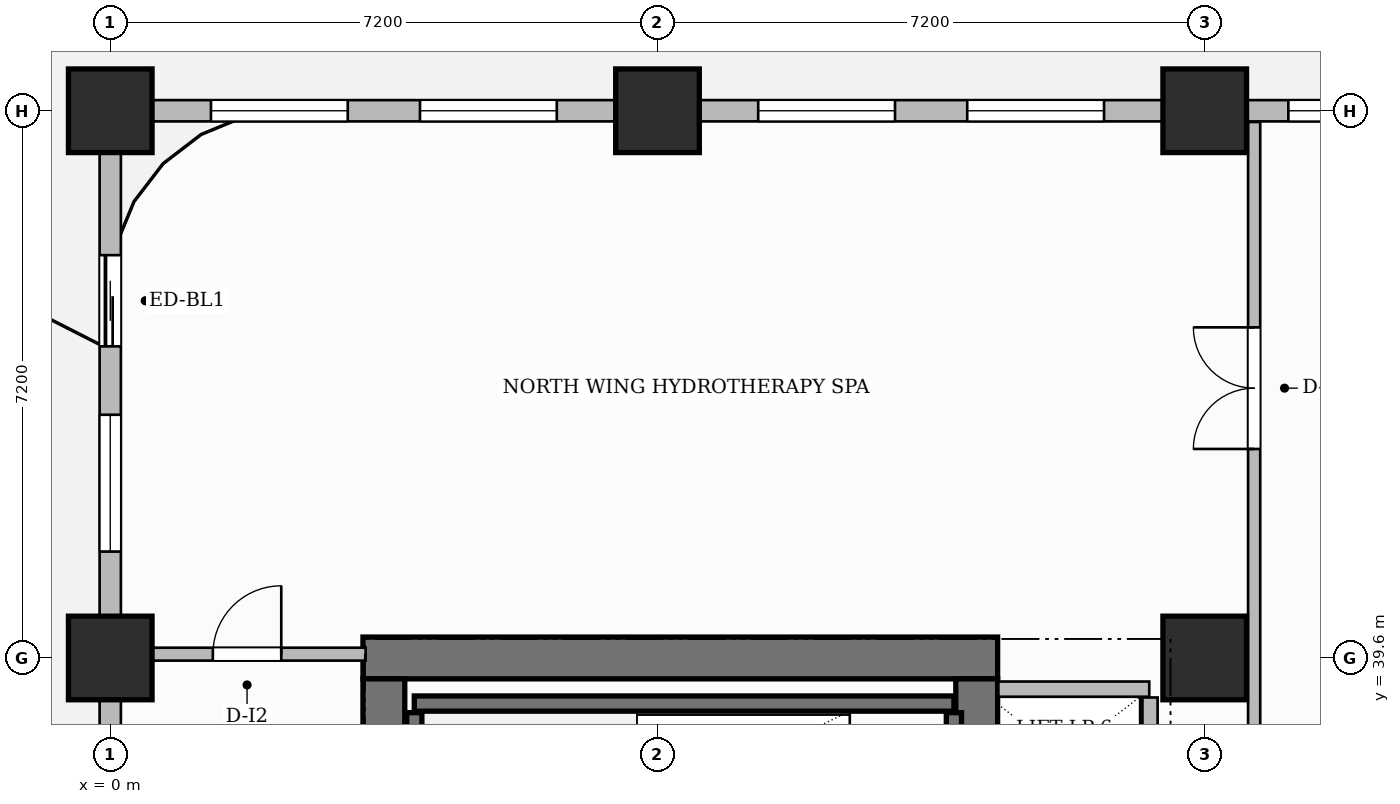
"""IFC4 building model, lengths in metres.
Left out: names, types, materials, properties, quantities, classifications, styles, units other than length and angle.
Written with IfcOpenShell. Run it as: python <this file> out.ifc"""

import sys

from ifc_helpers import new_model, si_unit, direction, frame, frame_2d, origin, origin_2d, place, context, subcontext, project, spatial, rectangle, extrude, source, transform, mapped, element, fill, save


model = new_model("IFC4")
c1 = context("Model", 3, precision=1e-05, world=origin(), true_north=direction((0.0, 1.0)))
c2 = subcontext(c1, "Body", "Model", "MODEL_VIEW")
j1 = project(units=[si_unit("LENGTHUNIT", "METRE"), si_unit("PLANEANGLEUNIT", "RADIAN")], contexts=[c1])
p1 = place(None, origin())
s1 = spatial("IfcSite", under=j1, at=p1, CompositionType="ELEMENT")
p2 = place(p1, origin())
s2 = spatial("IfcBuilding", under=s1, at=p2, CompositionType="ELEMENT")
p3 = place(p2, frame((0.0, 0.0, 65.7)))
s3 = spatial("IfcBuildingStorey", under=s2, at=p3, CompositionType="ELEMENT", Elevation=65.7)
p4 = place(p3, frame((3.325, 39.6, 0.0), z_axis=(0.0, 0.0, 1.0), x_axis=(1.0, 0.0, 0.0)))
e1 = element("IfcWall", 1, at=p4, inside=s3, PredefinedType="SHEAR", context=c2, shape_type="SweptSolid", body=[
    extrude(rectangle(XDim=8.35, YDim=0.55, at=frame_2d((4.175, 0.0))), origin(), (0.0, 0.0, 1.0), 3.7),
])
p5 = place(p3, frame((3.6, 25.475, 0.0), z_axis=(0.0, 0.0, 1.0), x_axis=(0.0, 1.0, 0.0)))
e2 = element("IfcWall", 2, at=p5, inside=s3, PredefinedType="SHEAR", context=c2, shape_type="SweptSolid", body=[
    extrude(rectangle(XDim=13.85, YDim=0.55, at=frame_2d((6.925, 0.0))), origin(), (0.0, 0.0, 1.0), 3.7),
])
p6 = place(p3, frame((11.4, 25.475, 0.0), z_axis=(0.0, 0.0, 1.0), x_axis=(0.0, 1.0, 0.0)))
e3 = element("IfcWall", 3, at=p6, inside=s3, PredefinedType="SHEAR", context=c2, shape_type="SweptSolid", body=[
    extrude(rectangle(XDim=13.85, YDim=0.55, at=frame_2d((6.925, 0.0))), origin(), (0.0, 0.0, 1.0), 3.7),
])
p7 = place(p6, frame((6.495, 0.0, 0.0)))
e4 = element("IfcOpeningElement", 4, at=p7, cuts=e3, PredefinedType="OPENING", context=c2, shape_type="SweptSolid", body=[
    extrude(rectangle(XDim=1.5, YDim=2.2, at=frame_2d((0.75, 1.1))), frame((0.0, 0.285, 0.0), z_axis=(0.0, -1.0, 0.0), x_axis=(1.0, 0.0, 0.0)), (0.0, 0.0, 1.0), 0.57),
])
m1 = source(origin(), c2, "Body", "SweptSolid", [
    extrude(rectangle(XDim=1.1, YDim=1.1, at=origin_2d()), origin(), (0.0, 0.0, 1.0), 3.7),
])
for number, where, z_axis, x_axis in (
    (5, (0.0, 39.6, 0.0), (0.0, 0.0, 1.0), (1.0, 0.0, 0.0)),
    (6, (0.0, 46.8, 0.0), (0.0, 0.0, 1.0), (1.0, 0.0, 0.0)),
    (7, (7.2, 46.8, 0.0), (0.0, 0.0, 1.0), (1.0, 0.0, 0.0)),
    (8, (14.4, 39.6, 0.0), (0.0, 0.0, 1.0), (1.0, 0.0, 0.0)),
    (9, (14.4, 46.8, 0.0), (0.0, 0.0, 1.0), (1.0, 0.0, 0.0)),
):
    element("IfcColumn", number, at=place(p3, frame(where, z_axis=z_axis, x_axis=x_axis)), inside=s3, PredefinedType="COLUMN", context=c2, shape_type="MappedRepresentation", body=[
        mapped(m1, transform((0.0, 0.0, 0.0), scale=1.0)),
    ])
p8 = place(p3, frame((4.0, 39.0, 0.0), z_axis=(0.0, 0.0, 1.0), x_axis=(1.0, 0.0, 0.0)))
e10 = element("IfcWall", 10, at=p8, inside=s3, PredefinedType="SHEAR", context=c2, shape_type="SweptSolid", body=[
    extrude(rectangle(XDim=7.1, YDim=0.2, at=frame_2d((3.55, 0.0))), origin(), (0.0, 0.0, 1.0), 3.7),
])
for number, where, z_axis, x_axis in (
    (11, (4.0, 36.18, 0.0), (0.0, 0.0, 1.0), (0.0, 1.0, 0.0)),
    (12, (11.1, 36.18, 0.0), (0.0, 0.0, 1.0), (0.0, 1.0, 0.0)),
):
    element("IfcWall", number, at=place(p3, frame(where, z_axis=z_axis, x_axis=x_axis)), inside=s3, PredefinedType="SHEAR", context=c2, shape_type="SweptSolid", body=[
        extrude(rectangle(XDim=2.7, YDim=0.2, at=frame_2d((1.35, 0.0))), origin(), (0.0, 0.0, 1.0), 3.7),
    ])
p9 = place(p3, frame((11.685, 39.19, 0.0), z_axis=(0.0, 0.0, 1.0), x_axis=(1.0, 0.0, 0.0)))
e13 = element("IfcWall", 13, at=p9, inside=s3, PredefinedType="PARTITIONING", context=c2, shape_type="SweptSolid", body=[
    extrude(rectangle(XDim=1.985, YDim=0.2, at=frame_2d((0.992, 0.0))), origin(), (0.0, 0.0, 1.0), 3.45),
])
p10 = place(p3, frame((13.68, 34.36, 0.0), z_axis=(0.0, 0.0, 1.0), x_axis=(0.0, 1.0, 0.0)))
e14 = element("IfcWall", 14, at=p10, inside=s3, PredefinedType="PARTITIONING", context=c2, shape_type="SweptSolid", body=[
    extrude(rectangle(XDim=4.72, YDim=0.2, at=frame_2d((2.36, 0.0))), origin(), (0.0, 0.0, 1.0), 3.45),
])
p11 = place(p3, frame((0.24, 39.65, 0.0), z_axis=(0.0, 0.0, 1.0), x_axis=(1.0, 0.0, 0.0)))
e15 = element("IfcWall", 15, at=p11, inside=s3, PredefinedType="PARTITIONING", context=c2, shape_type="SweptSolid", body=[
    extrude(rectangle(XDim=3.12, YDim=0.17, at=frame_2d((1.56, 0.0))), origin(), (0.0, 0.0, 1.0), 3.45),
])
p12 = place(p11, frame((1.11, 0.0, 0.0)))
e16 = element("IfcOpeningElement", 16, at=p12, cuts=e15, PredefinedType="OPENING", context=c2, shape_type="SweptSolid", body=[
    extrude(rectangle(XDim=0.9, YDim=2.15, at=frame_2d((0.45, 1.075))), frame((0.0, 0.095, 0.0), z_axis=(0.0, -1.0, 0.0), x_axis=(1.0, 0.0, 0.0)), (0.0, 0.0, 1.0), 0.19),
])
p13 = place(p3, frame((15.05, 34.34, 0.0), z_axis=(0.0, 0.0, 1.0), x_axis=(0.0, 1.0, 0.0)))
e17 = element("IfcWall", 17, at=p13, inside=s3, PredefinedType="PARTITIONING", context=c2, shape_type="SweptSolid", body=[
    extrude(rectangle(XDim=12.312, YDim=0.16, at=frame_2d((6.156, 0.0))), origin(), (0.0, 0.0, 1.0), 3.45),
])
p14 = place(p13, frame((8.01, 0.0, 0.0)))
e18 = element("IfcOpeningElement", 18, at=p14, cuts=e17, PredefinedType="OPENING", context=c2, shape_type="SweptSolid", body=[
    extrude(rectangle(XDim=1.6, YDim=2.4, at=frame_2d((0.8, 1.2))), frame((0.0, 0.09, 0.0), z_axis=(0.0, -1.0, 0.0), x_axis=(1.0, 0.0, 0.0)), (0.0, 0.0, 1.0), 0.18),
])
p15 = place(p3, frame((0.0, 25.25, 0.0), z_axis=(0.0, 0.0, 1.0), x_axis=(0.0, 1.0, 0.0)))
e19 = element("IfcWall", 19, at=p15, inside=s3, PredefinedType="SOLIDWALL", context=c2, shape_type="SweptSolid", body=[
    extrude(rectangle(XDim=21.5, YDim=0.28, at=frame_2d((10.75, 0.0))), origin(), (0.0, 0.0, 1.0), 2.885),
])
p16 = place(p15, frame((18.45, 0.0, 0.0)))
e20 = element("IfcOpeningElement", 20, at=p16, cuts=e19, PredefinedType="OPENING", context=c2, shape_type="SweptSolid", body=[
    extrude(rectangle(XDim=1.2, YDim=2.2, at=frame_2d((0.6, 1.1))), frame((0.0, 0.15, 0.0), z_axis=(0.0, -1.0, 0.0), x_axis=(1.0, 0.0, 0.0)), (0.0, 0.0, 1.0), 0.3),
])
p17 = place(p15, frame((0.8, 0.0, 0.0)))
e21 = element("IfcOpeningElement", 21, at=p17, cuts=e19, PredefinedType="OPENING", context=c2, shape_type="SweptSolid", body=[
    extrude(rectangle(XDim=1.2, YDim=2.2, at=frame_2d((0.6, 1.1))), frame((0.0, 0.15, 0.0), z_axis=(0.0, -1.0, 0.0), x_axis=(1.0, 0.0, 0.0)), (0.0, 0.0, 1.0), 0.3),
])
p18 = place(p15, frame((3.425, 0.0, 0.8)))
e22 = element("IfcOpeningElement", 22, at=p18, cuts=e19, PredefinedType="OPENING", context=c2, shape_type="SweptSolid", body=[
    extrude(rectangle(XDim=1.8, YDim=1.85, at=frame_2d((0.9, 0.925))), frame((0.0, 0.15, 0.0), z_axis=(0.0, -1.0, 0.0), x_axis=(1.0, 0.0, 0.0)), (0.0, 0.0, 1.0), 0.3),
])
p19 = place(p15, frame((8.475, 0.0, 0.8)))
e23 = element("IfcOpeningElement", 23, at=p19, cuts=e19, PredefinedType="OPENING", context=c2, shape_type="SweptSolid", body=[
    extrude(rectangle(XDim=1.8, YDim=1.85, at=frame_2d((0.9, 0.925))), frame((0.0, 0.15, 0.0), z_axis=(0.0, -1.0, 0.0), x_axis=(1.0, 0.0, 0.0)), (0.0, 0.0, 1.0), 0.3),
])
p20 = place(p15, frame((11.225, 0.0, 0.8)))
e24 = element("IfcOpeningElement", 24, at=p20, cuts=e19, PredefinedType="OPENING", context=c2, shape_type="SweptSolid", body=[
    extrude(rectangle(XDim=1.8, YDim=1.85, at=frame_2d((0.9, 0.925))), frame((0.0, 0.15, 0.0), z_axis=(0.0, -1.0, 0.0), x_axis=(1.0, 0.0, 0.0)), (0.0, 0.0, 1.0), 0.3),
])
p21 = place(p15, frame((15.75, 0.0, 0.8)))
e25 = element("IfcOpeningElement", 25, at=p21, cuts=e19, PredefinedType="OPENING", context=c2, shape_type="SweptSolid", body=[
    extrude(rectangle(XDim=1.8, YDim=1.85, at=frame_2d((0.9, 0.925))), frame((0.0, 0.15, 0.0), z_axis=(0.0, -1.0, 0.0), x_axis=(1.0, 0.0, 0.0)), (0.0, 0.0, 1.0), 0.3),
])
p22 = place(p3, frame((0.0, 46.8, 0.0), z_axis=(0.0, 0.0, 1.0), x_axis=(1.0, 0.0, 0.0)))
e26 = element("IfcWall", 26, at=p22, inside=s3, PredefinedType="SOLIDWALL", context=c2, shape_type="SweptSolid", body=[
    extrude(rectangle(XDim=18.0, YDim=0.28, at=frame_2d((9.0, 0.0))), origin(), (0.0, 0.0, 1.0), 2.885),
])
p23 = place(p22, frame((1.325, 0.0, 0.8)))
e27 = element("IfcOpeningElement", 27, at=p23, cuts=e26, PredefinedType="OPENING", context=c2, shape_type="SweptSolid", body=[
    extrude(rectangle(XDim=1.8, YDim=1.85, at=frame_2d((0.9, 0.925))), frame((0.0, 0.15, 0.0), z_axis=(0.0, -1.0, 0.0), x_axis=(1.0, 0.0, 0.0)), (0.0, 0.0, 1.0), 0.3),
])
p24 = place(p22, frame((4.075, 0.0, 0.8)))
e28 = element("IfcOpeningElement", 28, at=p24, cuts=e26, PredefinedType="OPENING", context=c2, shape_type="SweptSolid", body=[
    extrude(rectangle(XDim=1.8, YDim=1.85, at=frame_2d((0.9, 0.925))), frame((0.0, 0.15, 0.0), z_axis=(0.0, -1.0, 0.0), x_axis=(1.0, 0.0, 0.0)), (0.0, 0.0, 1.0), 0.3),
])
p25 = place(p22, frame((8.525, 0.0, 0.8)))
e29 = element("IfcOpeningElement", 29, at=p25, cuts=e26, PredefinedType="OPENING", context=c2, shape_type="SweptSolid", body=[
    extrude(rectangle(XDim=1.8, YDim=1.85, at=frame_2d((0.9, 0.925))), frame((0.0, 0.15, 0.0), z_axis=(0.0, -1.0, 0.0), x_axis=(1.0, 0.0, 0.0)), (0.0, 0.0, 1.0), 0.3),
])
p26 = place(p22, frame((11.275, 0.0, 0.8)))
e30 = element("IfcOpeningElement", 30, at=p26, cuts=e26, PredefinedType="OPENING", context=c2, shape_type="SweptSolid", body=[
    extrude(rectangle(XDim=1.8, YDim=1.85, at=frame_2d((0.9, 0.925))), frame((0.0, 0.15, 0.0), z_axis=(0.0, -1.0, 0.0), x_axis=(1.0, 0.0, 0.0)), (0.0, 0.0, 1.0), 0.3),
])
p27 = place(p22, frame((15.5, 0.0, 0.8)))
e31 = element("IfcOpeningElement", 31, at=p27, cuts=e26, PredefinedType="OPENING", context=c2, shape_type="SweptSolid", body=[
    extrude(rectangle(XDim=1.4, YDim=1.85, at=frame_2d((0.7, 0.925))), frame((0.0, 0.15, 0.0), z_axis=(0.0, -1.0, 0.0), x_axis=(1.0, 0.0, 0.0)), (0.0, 0.0, 1.0), 0.3),
])
m2 = source(origin(), c2, "Body", "SweptSolid", [
    extrude(rectangle(XDim=0.9, YDim=2.15, at=frame_2d((0.45, 1.075))), frame((0.0, 0.025, 0.0), z_axis=(0.0, -1.0, 0.0), x_axis=(1.0, 0.0, 0.0)), (0.0, 0.0, 1.0), 0.05),
])
p28 = place(p12, origin())
e32 = element("IfcDoor", 32, at=p28, inside=s3, OperationType="SINGLE_SWING_RIGHT", PredefinedType="DOOR", context=c2, shape_type="MappedRepresentation", body=[
    mapped(m2, transform((0.0, 0.0, 0.0), scale=1.0)),
])
fill(e16, e32)
m3 = source(origin(), c2, "Body", "SweptSolid", [
    extrude(rectangle(XDim=1.6, YDim=2.4, at=frame_2d((0.8, 1.2))), frame((0.0, 0.025, 0.0), z_axis=(0.0, -1.0, 0.0), x_axis=(1.0, 0.0, 0.0)), (0.0, 0.0, 1.0), 0.05),
])
p29 = place(p14, origin())
e33 = element("IfcDoor", 33, at=p29, inside=s3, OperationType="DOUBLE_DOOR_SINGLE_SWING", PredefinedType="DOOR", context=c2, shape_type="MappedRepresentation", body=[
    mapped(m3, transform((0.0, 0.0, 0.0), scale=1.0)),
])
fill(e18, e33)
m4 = source(origin(), c2, "Body", "SweptSolid", [
    extrude(rectangle(XDim=1.2, YDim=2.2, at=frame_2d((0.6, 1.1))), frame((0.0, 0.025, 0.0), z_axis=(0.0, -1.0, 0.0), x_axis=(1.0, 0.0, 0.0)), (0.0, 0.0, 1.0), 0.05),
])
p30 = place(p16, origin())
e34 = element("IfcDoor", 34, at=p30, inside=s3, OperationType="SLIDING_TO_LEFT", PredefinedType="DOOR", context=c2, shape_type="MappedRepresentation", body=[
    mapped(m4, transform((0.0, 0.0, 0.0), scale=1.0)),
])
fill(e20, e34)
m5 = source(origin(), c2, "Body", "SweptSolid", [
    extrude(rectangle(XDim=1.8, YDim=1.85, at=frame_2d((0.9, 0.925))), frame((0.0, 0.03, 0.0), z_axis=(0.0, -1.0, 0.0), x_axis=(1.0, 0.0, 0.0)), (0.0, 0.0, 1.0), 0.06),
])
p31 = place(p21, origin())
e35 = element("IfcWindow", 35, at=p31, inside=s3, PartitioningType="DOUBLE_PANEL_VERTICAL", PredefinedType="WINDOW", context=c2, shape_type="MappedRepresentation", body=[
    mapped(m5, transform((0.0, 0.0, 0.0), scale=1.0)),
])
fill(e25, e35)
p32 = place(p23, origin())
e36 = element("IfcWindow", 36, at=p32, inside=s3, PartitioningType="DOUBLE_PANEL_VERTICAL", PredefinedType="WINDOW", context=c2, shape_type="MappedRepresentation", body=[
    mapped(m5, transform((0.0, 0.0, 0.0), scale=1.0)),
])
fill(e27, e36)
p33 = place(p24, origin())
e37 = element("IfcWindow", 37, at=p33, inside=s3, PartitioningType="DOUBLE_PANEL_VERTICAL", PredefinedType="WINDOW", context=c2, shape_type="MappedRepresentation", body=[
    mapped(m5, transform((0.0, 0.0, 0.0), scale=1.0)),
])
fill(e28, e37)
p34 = place(p25, origin())
e38 = element("IfcWindow", 38, at=p34, inside=s3, PartitioningType="DOUBLE_PANEL_VERTICAL", PredefinedType="WINDOW", context=c2, shape_type="MappedRepresentation", body=[
    mapped(m5, transform((0.0, 0.0, 0.0), scale=1.0)),
])
fill(e29, e38)
p35 = place(p26, origin())
e39 = element("IfcWindow", 39, at=p35, inside=s3, PartitioningType="DOUBLE_PANEL_VERTICAL", PredefinedType="WINDOW", context=c2, shape_type="MappedRepresentation", body=[
    mapped(m5, transform((0.0, 0.0, 0.0), scale=1.0)),
])
fill(e30, e39)
m6 = source(origin(), c2, "Body", "SweptSolid", [
    extrude(rectangle(XDim=1.4, YDim=1.85, at=frame_2d((0.7, 0.925))), frame((0.0, 0.03, 0.0), z_axis=(0.0, -1.0, 0.0), x_axis=(1.0, 0.0, 0.0)), (0.0, 0.0, 1.0), 0.06),
])
p36 = place(p27, origin())
e40 = element("IfcWindow", 40, at=p36, inside=s3, PartitioningType="SINGLE_PANEL", PredefinedType="WINDOW", context=c2, shape_type="MappedRepresentation", body=[
    mapped(m6, transform((0.0, 0.0, 0.0), scale=1.0)),
])
fill(e31, e40)
save(model, sys.argv[1])
